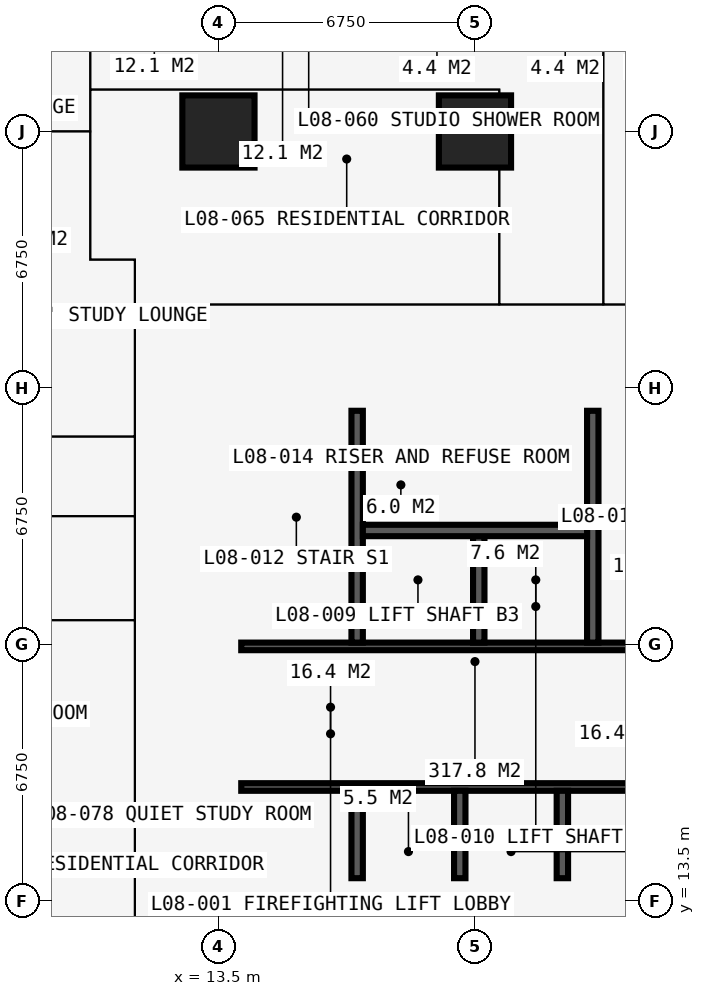
"""IFC4 building model, lengths in metres.
Left out: names, types, materials, properties, quantities, classifications, styles, units other than length and angle.
Written with IfcOpenShell. Run it as: python <this file> out.ifc"""

import sys

from ifc_helpers import new_model, si_unit, direction, frame, frame_2d, origin, origin_2d, place, context, subcontext, project, spatial, rectangle, extrude, element, fill, save


model = new_model("IFC4")
c1 = context("Model", 3, precision=1e-05, world=origin(), true_north=direction((0.0, 1.0)))
c2 = subcontext(c1, "Body", "Model", "MODEL_VIEW")
j1 = project(units=[si_unit("LENGTHUNIT", "METRE"), si_unit("PLANEANGLEUNIT", "RADIAN")], contexts=[c1])
p1 = place(None, origin())
s1 = spatial("IfcSite", under=j1, at=p1, CompositionType="ELEMENT")
p2 = place(p1, origin())
s2 = spatial("IfcBuilding", under=s1, at=p2, CompositionType="ELEMENT")
p3 = place(p2, frame((0.0, 0.0, 32.4)))
s3 = spatial("IfcBuildingStorey", under=s2, at=p3, CompositionType="ELEMENT", Elevation=32.4)
for number, where, z_axis, x_axis in (
    (1, (13.5, 33.75, 0.0), (0.0, 0.0, 1.0), (1.0, 0.0, 0.0)),
    (2, (20.25, 33.75, 0.0), (0.0, 0.0, 1.0), (1.0, 0.0, 0.0)),
):
    element("IfcColumn", number, at=place(p3, frame(where, z_axis=z_axis, x_axis=x_axis)), inside=s3, PredefinedType="COLUMN", context=c2, shape_type="SweptSolid", body=[
        extrude(rectangle(XDim=1.9, YDim=1.9, at=origin_2d()), origin(), (0.0, 0.0, 1.0), 3.6),
    ])
p4 = place(p3, frame((12.9, 13.5, 0.0), z_axis=(0.0, 0.0, 1.0), x_axis=(1.0, 0.0, 0.0)))
e3 = element("IfcWall", 3, at=p4, inside=s3, PredefinedType="SHEAR", context=c2, shape_type="SweptSolid", body=[
    extrude(rectangle(XDim=14.7, YDim=1.2, at=frame_2d((7.35, 0.0))), origin(), (0.0, 0.0, 1.0), 3.6),
])
p5 = place(p3, frame((27.6, 27.0, 0.0), z_axis=(0.0, 0.0, 1.0), x_axis=(-1.0, 0.0, 0.0)))
e4 = element("IfcWall", 4, at=p5, inside=s3, PredefinedType="SHEAR", context=c2, shape_type="SweptSolid", body=[
    extrude(rectangle(XDim=14.7, YDim=1.2, at=frame_2d((7.35, 0.0))), origin(), (0.0, 0.0, 1.0), 3.6),
])
p6 = place(p5, frame((5.225, 0.0, 0.0)))
e5 = element("IfcOpeningElement", 5, at=p6, cuts=e4, PredefinedType="OPENING", context=c2, shape_type="SweptSolid", body=[
    extrude(rectangle(XDim=0.9, YDim=2.2, at=frame_2d((0.45, 1.1))), frame((0.0, 0.61, 0.0), z_axis=(0.0, -1.0, 0.0), x_axis=(1.0, 0.0, 0.0)), (0.0, 0.0, 1.0), 1.22),
])
p7 = place(p5, frame((8.2, 0.0, 0.0)))
e6 = element("IfcOpeningElement", 6, at=p7, cuts=e4, PredefinedType="OPENING", context=c2, shape_type="SweptSolid", body=[
    extrude(rectangle(XDim=1.0, YDim=2.2, at=frame_2d((0.5, 1.1))), frame((0.0, 0.61, 0.0), z_axis=(0.0, -1.0, 0.0), x_axis=(1.0, 0.0, 0.0)), (0.0, 0.0, 1.0), 1.22),
])
p8 = place(p3, frame((13.5, 26.4, 0.0), z_axis=(0.0, 0.0, 1.0), x_axis=(0.0, -1.0, 0.0)))
e7 = element("IfcWall", 7, at=p8, inside=s3, PredefinedType="SHEAR", context=c2, shape_type="SweptSolid", body=[
    extrude(rectangle(XDim=12.3, YDim=1.2, at=frame_2d((6.15, 0.0))), origin(), (0.0, 0.0, 1.0), 3.6),
])
p9 = place(p8, frame((7.45, 0.0, 0.0)))
e8 = element("IfcOpeningElement", 8, at=p9, cuts=e7, PredefinedType="OPENING", context=c2, shape_type="SweptSolid", body=[
    extrude(rectangle(XDim=1.2, YDim=2.2, at=frame_2d((0.6, 1.1))), frame((0.0, 0.61, 0.0), z_axis=(0.0, -1.0, 0.0), x_axis=(1.0, 0.0, 0.0)), (0.0, 0.0, 1.0), 1.22),
])
p10 = place(p3, frame((14.1, 16.5, 0.0), z_axis=(0.0, 0.0, 1.0), x_axis=(1.0, 0.0, 0.0)))
e9 = element("IfcWall", 9, at=p10, inside=s3, PredefinedType="SHEAR", context=c2, shape_type="SweptSolid", body=[
    extrude(rectangle(XDim=12.3, YDim=0.2, at=frame_2d((6.15, 0.0))), origin(), (0.0, 0.0, 1.0), 3.6),
])
p11 = place(p10, frame((0.9, 0.0, 0.0)))
e10 = element("IfcOpeningElement", 10, at=p11, cuts=e9, PredefinedType="OPENING", context=c2, shape_type="SweptSolid", body=[
    extrude(rectangle(XDim=1.1, YDim=2.2, at=frame_2d((0.55, 1.1))), frame((0.0, 0.11, 0.0), z_axis=(0.0, -1.0, 0.0), x_axis=(1.0, 0.0, 0.0)), (0.0, 0.0, 1.0), 0.22),
])
p12 = place(p10, frame((9.5, 0.0, 0.0)))
e11 = element("IfcOpeningElement", 11, at=p12, cuts=e9, PredefinedType="OPENING", context=c2, shape_type="SweptSolid", body=[
    extrude(rectangle(XDim=1.1, YDim=2.2, at=frame_2d((0.55, 1.1))), frame((0.0, 0.11, 0.0), z_axis=(0.0, -1.0, 0.0), x_axis=(1.0, 0.0, 0.0)), (0.0, 0.0, 1.0), 0.22),
])
p13 = place(p3, frame((14.1, 20.2, 0.0), z_axis=(0.0, 0.0, 1.0), x_axis=(1.0, 0.0, 0.0)))
e12 = element("IfcWall", 12, at=p13, inside=s3, PredefinedType="SHEAR", context=c2, shape_type="SweptSolid", body=[
    extrude(rectangle(XDim=12.3, YDim=0.2, at=frame_2d((6.15, 0.0))), origin(), (0.0, 0.0, 1.0), 3.6),
])
p14 = place(p13, frame((0.35, 0.0, 0.0)))
e13 = element("IfcOpeningElement", 13, at=p14, cuts=e12, PredefinedType="OPENING", context=c2, shape_type="SweptSolid", body=[
    extrude(rectangle(XDim=1.1, YDim=2.2, at=frame_2d((0.55, 1.1))), frame((0.0, 0.11, 0.0), z_axis=(0.0, -1.0, 0.0), x_axis=(1.0, 0.0, 0.0)), (0.0, 0.0, 1.0), 0.22),
])
p15 = place(p13, frame((9.75, 0.0, 0.0)))
e14 = element("IfcOpeningElement", 14, at=p15, cuts=e12, PredefinedType="OPENING", context=c2, shape_type="SweptSolid", body=[
    extrude(rectangle(XDim=1.1, YDim=2.2, at=frame_2d((0.55, 1.1))), frame((0.0, 0.11, 0.0), z_axis=(0.0, -1.0, 0.0), x_axis=(1.0, 0.0, 0.0)), (0.0, 0.0, 1.0), 0.22),
])
for number, where, z_axis, x_axis in (
    (15, (17.15, 20.3, 0.0), (0.0, 0.0, 1.0), (0.0, 1.0, 0.0)),
    (16, (23.35, 20.3, 0.0), (0.0, 0.0, 1.0), (0.0, 1.0, 0.0)),
):
    element("IfcWall", number, at=place(p3, frame(where, z_axis=z_axis, x_axis=x_axis)), inside=s3, PredefinedType="SHEAR", context=c2, shape_type="SweptSolid", body=[
        extrude(rectangle(XDim=6.1, YDim=0.3, at=frame_2d((3.05, 0.0))), origin(), (0.0, 0.0, 1.0), 3.6),
    ])
p16 = place(p3, frame((20.35, 20.3, 0.0), z_axis=(0.0, 0.0, 1.0), x_axis=(0.0, 1.0, 0.0)))
e17 = element("IfcWall", 17, at=p16, inside=s3, PredefinedType="SHEAR", context=c2, shape_type="SweptSolid", body=[
    extrude(rectangle(XDim=2.8, YDim=0.3, at=frame_2d((1.4, 0.0))), origin(), (0.0, 0.0, 1.0), 3.6),
])
p17 = place(p3, frame((17.3, 23.25, 0.0), z_axis=(0.0, 0.0, 1.0), x_axis=(1.0, 0.0, 0.0)))
e18 = element("IfcWall", 18, at=p17, inside=s3, PredefinedType="SHEAR", context=c2, shape_type="SweptSolid", body=[
    extrude(rectangle(XDim=5.9, YDim=0.3, at=frame_2d((2.95, 0.0))), origin(), (0.0, 0.0, 1.0), 3.6),
])
for number, where, z_axis, x_axis in (
    (19, (17.15, 14.1, 0.0), (0.0, 0.0, 1.0), (0.0, 1.0, 0.0)),
    (20, (19.85, 14.1, 0.0), (0.0, 0.0, 1.0), (0.0, 1.0, 0.0)),
    (21, (22.55, 14.1, 0.0), (0.0, 0.0, 1.0), (0.0, 1.0, 0.0)),
):
    element("IfcWall", number, at=place(p3, frame(where, z_axis=z_axis, x_axis=x_axis)), inside=s3, PredefinedType="SHEAR", context=c2, shape_type="SweptSolid", body=[
        extrude(rectangle(XDim=2.3, YDim=0.3, at=frame_2d((1.15, 0.0))), origin(), (0.0, 0.0, 1.0), 3.6),
    ])
p18 = place(p3, frame((18.875, 16.6, 0.0), z_axis=(0.0, 0.0, 1.0), x_axis=(0.0, 1.0, 0.0)))
e22 = element("IfcWall", 22, at=p18, inside=s3, PredefinedType="PARTITIONING", context=c2, shape_type="SweptSolid", body=[
    extrude(rectangle(XDim=3.5, YDim=0.15, at=frame_2d((1.75, 0.0))), origin(), (0.0, 0.0, 1.0), 3.375),
])
p19 = place(p18, frame((1.15, 0.0, 0.0)))
e23 = element("IfcOpeningElement", 23, at=p19, cuts=e22, PredefinedType="OPENING", context=c2, shape_type="SweptSolid", body=[
    extrude(rectangle(XDim=1.2, YDim=2.2, at=frame_2d((0.6, 1.1))), frame((0.0, 0.085, 0.0), z_axis=(0.0, -1.0, 0.0), x_axis=(1.0, 0.0, 0.0)), (0.0, 0.0, 1.0), 0.17),
])
p20 = place(p3, frame((21.625, 16.6, 0.0), z_axis=(0.0, 0.0, 1.0), x_axis=(0.0, 1.0, 0.0)))
e24 = element("IfcWall", 24, at=p20, inside=s3, PredefinedType="PARTITIONING", context=c2, shape_type="SweptSolid", body=[
    extrude(rectangle(XDim=3.5, YDim=0.15, at=frame_2d((1.75, 0.0))), origin(), (0.0, 0.0, 1.0), 3.375),
])
p21 = place(p20, frame((1.15, 0.0, 0.0)))
e25 = element("IfcOpeningElement", 25, at=p21, cuts=e24, PredefinedType="OPENING", context=c2, shape_type="SweptSolid", body=[
    extrude(rectangle(XDim=1.2, YDim=2.2, at=frame_2d((0.6, 1.1))), frame((0.0, 0.085, 0.0), z_axis=(0.0, -1.0, 0.0), x_axis=(1.0, 0.0, 0.0)), (0.0, 0.0, 1.0), 0.17),
])
p22 = place(p3, frame((20.12, 16.6, 0.0), z_axis=(0.0, 0.0, 1.0), x_axis=(0.0, 1.0, 0.0)))
e26 = element("IfcWall", 26, at=p22, inside=s3, PredefinedType="PARTITIONING", context=c2, shape_type="SweptSolid", body=[
    extrude(rectangle(XDim=3.5, YDim=0.15, at=frame_2d((1.75, 0.0))), origin(), (0.0, 0.0, 1.0), 3.375),
])
p23 = place(p3, frame((19.375, 23.4, 0.0), z_axis=(0.0, 0.0, 1.0), x_axis=(0.0, 1.0, 0.0)))
e27 = element("IfcWall", 27, at=p23, inside=s3, PredefinedType="PARTITIONING", context=c2, shape_type="SweptSolid", body=[
    extrude(rectangle(XDim=3.0, YDim=0.15, at=frame_2d((1.5, 0.0))), origin(), (0.0, 0.0, 1.0), 3.375),
])
p24 = place(p3, frame((-0.734, 23.625, 0.0), z_axis=(0.0, 0.0, 1.0), x_axis=(1.0, 0.0, 0.0)))
e28 = element("IfcWall", 28, at=p24, inside=s3, PredefinedType="PARTITIONING", context=c2, shape_type="SweptSolid", body=[
    extrude(rectangle(XDim=12.034, YDim=0.15, at=frame_2d((6.017, 0.0))), origin(), (0.0, 0.0, 1.0), 3.375),
])
p25 = place(p3, frame((4.15, 33.75, 0.0), z_axis=(0.0, 0.0, 1.0), x_axis=(1.0, 0.0, 0.0)))
e29 = element("IfcWall", 29, at=p25, inside=s3, PredefinedType="PARTITIONING", context=c2, shape_type="SweptSolid", body=[
    extrude(rectangle(XDim=5.975, YDim=0.15, at=frame_2d((2.988, 0.0))), origin(), (0.0, 0.0, 1.0), 2.877),
])
for number, where, z_axis, x_axis in (
    (30, (5.65, 20.887, 0.0), (0.0, 0.0, 1.0), (1.0, 0.0, 0.0)),
    (31, (5.65, 25.725, 0.0), (0.0, 0.0, 1.0), (1.0, 0.0, 0.0)),
):
    element("IfcWall", number, at=place(p3, frame(where, z_axis=z_axis, x_axis=x_axis)), inside=s3, PredefinedType="PARTITIONING", context=c2, shape_type="SweptSolid", body=[
        extrude(rectangle(XDim=5.65, YDim=0.15, at=frame_2d((2.825, 0.0))), origin(), (0.0, 0.0, 1.0), 3.375),
    ])
p26 = place(p3, frame((10.125, 30.375, 0.0), z_axis=(0.0, 0.0, 1.0), x_axis=(0.0, 1.0, 0.0)))
e32 = element("IfcWall", 32, at=p26, inside=s3, PredefinedType="PARTITIONING", context=c2, shape_type="SweptSolid", body=[
    extrude(rectangle(XDim=10.859, YDim=0.15, at=frame_2d((5.429, 0.0))), origin(), (0.0, 0.0, 1.0), 3.375),
])
p27 = place(p3, frame((10.125, 30.375, 0.0), z_axis=(0.0, 0.0, 1.0), x_axis=(1.0, 0.0, 0.0)))
e33 = element("IfcWall", 33, at=p27, inside=s3, PredefinedType="PARTITIONING", context=c2, shape_type="SweptSolid", body=[
    extrude(rectangle(XDim=1.175, YDim=0.15, at=frame_2d((0.587, 0.0))), origin(), (0.0, 0.0, 1.0), 3.375),
])
p28 = place(p3, frame((10.125, 34.85, 0.0), z_axis=(0.0, 0.0, 1.0), x_axis=(1.0, 0.0, 0.0)))
e34 = element("IfcWall", 34, at=p28, inside=s3, PredefinedType="PARTITIONING", context=c2, shape_type="SweptSolid", body=[
    extrude(rectangle(XDim=10.762, YDim=0.15, at=frame_2d((5.381, 0.0))), origin(), (0.0, 0.0, 1.0), 3.375),
])
p29 = place(p28, frame((4.9, 0.0, 0.0)))
e35 = element("IfcOpeningElement", 35, at=p29, cuts=e34, PredefinedType="OPENING", context=c2, shape_type="SweptSolid", body=[
    extrude(rectangle(XDim=0.95, YDim=2.2, at=frame_2d((0.475, 1.1))), frame((0.0, 0.085, 0.0), z_axis=(0.0, -1.0, 0.0), x_axis=(1.0, 0.0, 0.0)), (0.0, 0.0, 1.0), 0.17),
])
p30 = place(p3, frame((11.3, 11.3, 0.0), z_axis=(0.0, 0.0, 1.0), x_axis=(0.0, 1.0, 0.0)))
e36 = element("IfcWall", 36, at=p30, inside=s3, PredefinedType="PARTITIONING", context=c2, shape_type="SweptSolid", body=[
    extrude(rectangle(XDim=19.075, YDim=0.15, at=frame_2d((9.538, 0.0))), origin(), (0.0, 0.0, 1.0), 3.375),
])
p31 = place(p30, frame((12.875, 0.0, 0.0)))
e37 = element("IfcOpeningElement", 37, at=p31, cuts=e36, PredefinedType="OPENING", context=c2, shape_type="SweptSolid", body=[
    extrude(rectangle(XDim=1.0, YDim=2.2, at=frame_2d((0.5, 1.1))), frame((0.0, 0.085, 0.0), z_axis=(0.0, -1.0, 0.0), x_axis=(1.0, 0.0, 0.0)), (0.0, 0.0, 1.0), 0.17),
])
p32 = place(p30, frame((10.438, 0.0, 0.0)))
e38 = element("IfcOpeningElement", 38, at=p32, cuts=e36, PredefinedType="OPENING", context=c2, shape_type="SweptSolid", body=[
    extrude(rectangle(XDim=1.0, YDim=2.2, at=frame_2d((0.5, 1.1))), frame((0.0, 0.085, 0.0), z_axis=(0.0, -1.0, 0.0), x_axis=(1.0, 0.0, 0.0)), (0.0, 0.0, 1.0), 0.17),
])
p33 = place(p30, frame((15.675, 0.0, 0.0)))
e39 = element("IfcOpeningElement", 39, at=p33, cuts=e36, PredefinedType="OPENING", context=c2, shape_type="SweptSolid", body=[
    extrude(rectangle(XDim=0.95, YDim=2.2, at=frame_2d((0.475, 1.1))), frame((0.0, 0.085, 0.0), z_axis=(0.0, -1.0, 0.0), x_axis=(1.0, 0.0, 0.0)), (0.0, 0.0, 1.0), 0.17),
])
p34 = place(p3, frame((11.3, 29.2, 0.0), z_axis=(0.0, 0.0, 1.0), x_axis=(1.0, 0.0, 0.0)))
e40 = element("IfcWall", 40, at=p34, inside=s3, PredefinedType="PARTITIONING", context=c2, shape_type="SweptSolid", body=[
    extrude(rectangle(XDim=19.075, YDim=0.15, at=frame_2d((9.538, 0.0))), origin(), (0.0, 0.0, 1.0), 3.375),
])
p35 = place(p34, frame((12.875, 0.0, 0.0)))
e41 = element("IfcOpeningElement", 41, at=p35, cuts=e40, PredefinedType="OPENING", context=c2, shape_type="SweptSolid", body=[
    extrude(rectangle(XDim=1.0, YDim=2.2, at=frame_2d((0.5, 1.1))), frame((0.0, 0.085, 0.0), z_axis=(0.0, -1.0, 0.0), x_axis=(1.0, 0.0, 0.0)), (0.0, 0.0, 1.0), 0.17),
])
p36 = place(p34, frame((10.438, 0.0, 0.0)))
e42 = element("IfcOpeningElement", 42, at=p36, cuts=e40, PredefinedType="OPENING", context=c2, shape_type="SweptSolid", body=[
    extrude(rectangle(XDim=1.0, YDim=2.2, at=frame_2d((0.5, 1.1))), frame((0.0, 0.085, 0.0), z_axis=(0.0, -1.0, 0.0), x_axis=(1.0, 0.0, 0.0)), (0.0, 0.0, 1.0), 0.17),
])
p37 = place(p34, frame((15.675, 0.0, 0.0)))
e43 = element("IfcOpeningElement", 43, at=p37, cuts=e40, PredefinedType="OPENING", context=c2, shape_type="SweptSolid", body=[
    extrude(rectangle(XDim=0.95, YDim=2.2, at=frame_2d((0.475, 1.1))), frame((0.0, 0.085, 0.0), z_axis=(0.0, -1.0, 0.0), x_axis=(1.0, 0.0, 0.0)), (0.0, 0.0, 1.0), 0.17),
])
p38 = place(p3, frame((20.887, 29.2, 0.0), z_axis=(0.0, 0.0, 1.0), x_axis=(0.0, 1.0, 0.0)))
e44 = element("IfcWall", 44, at=p38, inside=s3, PredefinedType="PARTITIONING", context=c2, shape_type="SweptSolid", body=[
    extrude(rectangle(XDim=5.65, YDim=0.15, at=frame_2d((2.825, 0.0))), origin(), (0.0, 0.0, 1.0), 3.375),
])
p39 = place(p3, frame((23.625, 29.2, 0.0), z_axis=(0.0, 0.0, 1.0), x_axis=(0.0, 1.0, 0.0)))
e45 = element("IfcWall", 45, at=p39, inside=s3, PredefinedType="PARTITIONING", context=c2, shape_type="SweptSolid", body=[
    extrude(rectangle(XDim=12.034, YDim=0.15, at=frame_2d((6.017, 0.0))), origin(), (0.0, 0.0, 1.0), 3.375),
])
p40 = place(p11, origin())
e46 = element("IfcDoor", 46, at=p40, inside=s3, OperationType="DOUBLE_DOOR_SLIDING", PredefinedType="DOOR", context=c2, shape_type="SweptSolid", body=[
    extrude(rectangle(XDim=1.1, YDim=2.2, at=frame_2d((0.55, 1.1))), frame((0.0, 0.025, 0.0), z_axis=(0.0, -1.0, 0.0), x_axis=(1.0, 0.0, 0.0)), (0.0, 0.0, 1.0), 0.05),
])
fill(e10, e46)
p41 = place(p12, origin())
e47 = element("IfcDoor", 47, at=p41, inside=s3, OperationType="DOUBLE_DOOR_SLIDING", PredefinedType="DOOR", context=c2, shape_type="SweptSolid", body=[
    extrude(rectangle(XDim=1.1, YDim=2.2, at=frame_2d((0.55, 1.1))), frame((0.0, 0.025, 0.0), z_axis=(0.0, -1.0, 0.0), x_axis=(1.0, 0.0, 0.0)), (0.0, 0.0, 1.0), 0.05),
])
fill(e11, e47)
p42 = place(p9, origin())
e48 = element("IfcDoor", 48, at=p42, inside=s3, OperationType="DOUBLE_DOOR_SINGLE_SWING", PredefinedType="DOOR", context=c2, shape_type="SweptSolid", body=[
    extrude(rectangle(XDim=1.2, YDim=2.2, at=frame_2d((0.6, 1.1))), frame((0.0, 0.025, 0.0), z_axis=(0.0, -1.0, 0.0), x_axis=(1.0, 0.0, 0.0)), (0.0, 0.0, 1.0), 0.05),
])
fill(e8, e48)
p43 = place(p19, origin())
e49 = element("IfcDoor", 49, at=p43, inside=s3, OperationType="DOUBLE_DOOR_SINGLE_SWING", PredefinedType="DOOR", context=c2, shape_type="SweptSolid", body=[
    extrude(rectangle(XDim=1.2, YDim=2.2, at=frame_2d((0.6, 1.1))), frame((0.0, 0.025, 0.0), z_axis=(0.0, -1.0, 0.0), x_axis=(1.0, 0.0, 0.0)), (0.0, 0.0, 1.0), 0.05),
])
fill(e23, e49)
p44 = place(p21, origin())
e50 = element("IfcDoor", 50, at=p44, inside=s3, OperationType="DOUBLE_DOOR_SINGLE_SWING", PredefinedType="DOOR", context=c2, shape_type="SweptSolid", body=[
    extrude(rectangle(XDim=1.2, YDim=2.2, at=frame_2d((0.6, 1.1))), frame((0.0, 0.025, 0.0), z_axis=(0.0, -1.0, 0.0), x_axis=(1.0, 0.0, 0.0)), (0.0, 0.0, 1.0), 0.05),
])
fill(e25, e50)
p45 = place(p6, origin())
e51 = element("IfcDoor", 51, at=p45, inside=s3, OperationType="SINGLE_SWING_LEFT", PredefinedType="DOOR", context=c2, shape_type="SweptSolid", body=[
    extrude(rectangle(XDim=0.9, YDim=2.2, at=frame_2d((0.45, 1.1))), frame((0.0, 0.4, 0.0), z_axis=(0.0, -1.0, 0.0), x_axis=(1.0, 0.0, 0.0)), (0.0, 0.0, 1.0), 0.8),
])
fill(e5, e51)
p46 = place(p7, origin())
e52 = element("IfcDoor", 52, at=p46, inside=s3, OperationType="SINGLE_SWING_LEFT", PredefinedType="DOOR", context=c2, shape_type="SweptSolid", body=[
    extrude(rectangle(XDim=1.0, YDim=2.2, at=frame_2d((0.5, 1.1))), frame((0.0, 0.025, 0.0), z_axis=(0.0, -1.0, 0.0), x_axis=(1.0, 0.0, 0.0)), (0.0, 0.0, 1.0), 0.05),
])
fill(e6, e52)
p47 = place(p14, origin())
e53 = element("IfcDoor", 53, at=p47, inside=s3, OperationType="SINGLE_SWING_LEFT", PredefinedType="DOOR", context=c2, shape_type="SweptSolid", body=[
    extrude(rectangle(XDim=1.1, YDim=2.2, at=frame_2d((0.55, 1.1))), frame((0.0, 0.025, 0.0), z_axis=(0.0, -1.0, 0.0), x_axis=(1.0, 0.0, 0.0)), (0.0, 0.0, 1.0), 0.05),
])
fill(e13, e53)
p48 = place(p15, origin())
e54 = element("IfcDoor", 54, at=p48, inside=s3, OperationType="SINGLE_SWING_LEFT", PredefinedType="DOOR", context=c2, shape_type="SweptSolid", body=[
    extrude(rectangle(XDim=1.1, YDim=2.2, at=frame_2d((0.55, 1.1))), frame((0.0, 0.025, 0.0), z_axis=(0.0, -1.0, 0.0), x_axis=(1.0, 0.0, 0.0)), (0.0, 0.0, 1.0), 0.05),
])
fill(e14, e54)
p49 = place(p35, origin())
e55 = element("IfcDoor", 55, at=p49, inside=s3, OperationType="SINGLE_SWING_LEFT", PredefinedType="DOOR", context=c2, shape_type="SweptSolid", body=[
    extrude(rectangle(XDim=1.0, YDim=2.2, at=frame_2d((0.5, 1.1))), frame((0.0, 0.025, 0.0), z_axis=(0.0, -1.0, 0.0), x_axis=(1.0, 0.0, 0.0)), (0.0, 0.0, 1.0), 0.05),
])
fill(e41, e55)
p50 = place(p36, origin())
e56 = element("IfcDoor", 56, at=p50, inside=s3, OperationType="SINGLE_SWING_LEFT", PredefinedType="DOOR", context=c2, shape_type="SweptSolid", body=[
    extrude(rectangle(XDim=1.0, YDim=2.2, at=frame_2d((0.5, 1.1))), frame((0.0, 0.025, 0.0), z_axis=(0.0, -1.0, 0.0), x_axis=(1.0, 0.0, 0.0)), (0.0, 0.0, 1.0), 0.05),
])
fill(e42, e56)
p51 = place(p29, origin())
e57 = element("IfcDoor", 57, at=p51, inside=s3, OperationType="SINGLE_SWING_LEFT", PredefinedType="DOOR", context=c2, shape_type="SweptSolid", body=[
    extrude(rectangle(XDim=0.95, YDim=2.2, at=frame_2d((0.475, 1.1))), frame((0.0, 0.025, 0.0), z_axis=(0.0, -1.0, 0.0), x_axis=(1.0, 0.0, 0.0)), (0.0, 0.0, 1.0), 0.05),
])
fill(e35, e57)
p52 = place(p31, origin())
e58 = element("IfcDoor", 58, at=p52, inside=s3, OperationType="SINGLE_SWING_LEFT", PredefinedType="DOOR", context=c2, shape_type="SweptSolid", body=[
    extrude(rectangle(XDim=1.0, YDim=2.2, at=frame_2d((0.5, 1.1))), frame((0.0, 0.025, 0.0), z_axis=(0.0, -1.0, 0.0), x_axis=(1.0, 0.0, 0.0)), (0.0, 0.0, 1.0), 0.05),
])
fill(e37, e58)
p53 = place(p32, origin())
e59 = element("IfcDoor", 59, at=p53, inside=s3, OperationType="SINGLE_SWING_LEFT", PredefinedType="DOOR", context=c2, shape_type="SweptSolid", body=[
    extrude(rectangle(XDim=1.0, YDim=2.2, at=frame_2d((0.5, 1.1))), frame((0.0, 0.025, 0.0), z_axis=(0.0, -1.0, 0.0), x_axis=(1.0, 0.0, 0.0)), (0.0, 0.0, 1.0), 0.05),
])
fill(e38, e59)
p54 = place(p33, origin())
e60 = element("IfcDoor", 60, at=p54, inside=s3, OperationType="SINGLE_SWING_LEFT", PredefinedType="DOOR", context=c2, shape_type="SweptSolid", body=[
    extrude(rectangle(XDim=0.95, YDim=2.2, at=frame_2d((0.475, 1.1))), frame((0.0, 0.025, 0.0), z_axis=(0.0, -1.0, 0.0), x_axis=(1.0, 0.0, 0.0)), (0.0, 0.0, 1.0), 0.05),
])
fill(e39, e60)
save(model, sys.argv[1])
